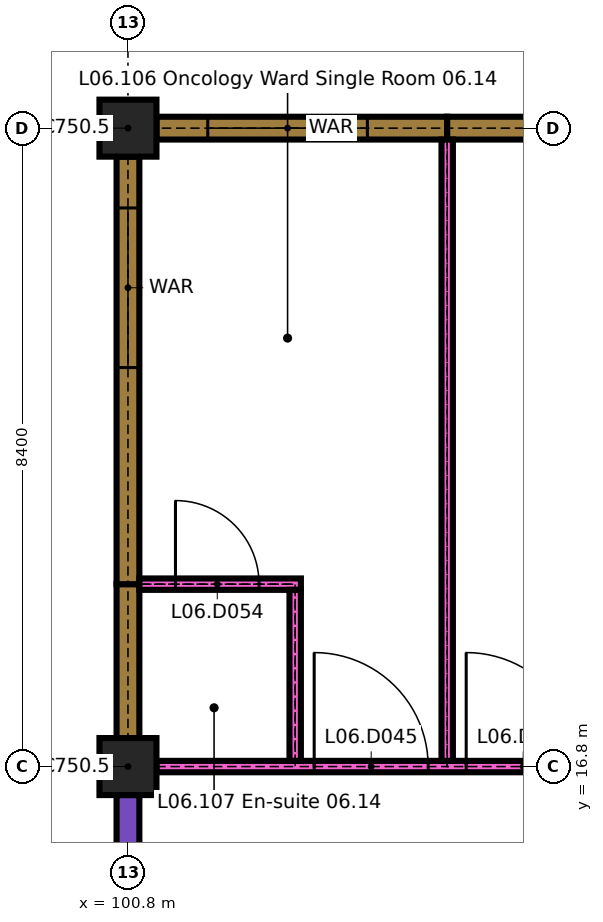
"""IFC4 building model, lengths in metres.
Left out: names, types, materials, properties, quantities, classifications, styles, units other than length and angle.
Written with IfcOpenShell. Run it as: python <this file> out.ifc"""

import sys

from ifc_helpers import new_model, si_unit, direction, frame, frame_2d, origin, origin_2d, place, context, subcontext, project, spatial, rectangle, extrude, element, fill, save


model = new_model("IFC4")
c1 = context("Model", 3, precision=1e-05, world=origin(), true_north=direction((0.0, 1.0)))
c2 = subcontext(c1, "Body", "Model", "MODEL_VIEW")
j1 = project(units=[si_unit("LENGTHUNIT", "METRE"), si_unit("PLANEANGLEUNIT", "RADIAN")], contexts=[c1])
p1 = place(None, origin())
s1 = spatial("IfcSite", under=j1, at=p1, CompositionType="ELEMENT")
p2 = place(p1, origin())
s2 = spatial("IfcBuilding", under=s1, at=p2, CompositionType="ELEMENT")
p3 = place(p2, frame((0.0, 0.0, 26.1)))
s3 = spatial("IfcBuildingStorey", under=s2, at=p3, CompositionType="ELEMENT", Elevation=26.1)
for number, where, z_axis, x_axis in (
    (1, (100.8, 16.8, 0.0), (0.0, 0.0, 1.0), (1.0, 0.0, 0.0)),
    (2, (100.8, 25.2, 0.0), (0.0, 0.0, 1.0), (1.0, 0.0, 0.0)),
):
    element("IfcColumn", number, at=place(p3, frame(where, z_axis=z_axis, x_axis=x_axis)), inside=s3, PredefinedType="COLUMN", context=c2, shape_type="SweptSolid", body=[
        extrude(rectangle(XDim=0.75, YDim=0.75, at=origin_2d()), origin(), (0.0, 0.0, 1.0), 3.2),
    ])
p4 = place(p3, frame((101.175, 25.2, 0.0), z_axis=(0.0, 0.0, 1.0), x_axis=(1.0, 0.0, 0.0)))
e3 = element("IfcWall", 3, at=p4, inside=s3, PredefinedType="SOLIDWALL", context=c2, shape_type="SweptSolid", body=[
    extrude(rectangle(XDim=3.825, YDim=0.3, at=frame_2d((1.913, 0.0))), origin(), (0.0, 0.0, 1.0), 2.9),
])
p5 = place(p4, frame((0.675, 0.0, 0.9)))
e4 = element("IfcOpeningElement", 4, at=p5, cuts=e3, PredefinedType="OPENING", context=c2, shape_type="SweptSolid", body=[
    extrude(rectangle(XDim=2.1, YDim=1.5, at=frame_2d((1.05, 0.75))), frame((0.0, 0.16, 0.0), z_axis=(0.0, -1.0, 0.0), x_axis=(1.0, 0.0, 0.0)), (0.0, 0.0, 1.0), 0.32),
])
p6 = place(p3, frame((105.0, 25.2, 0.0), z_axis=(0.0, 0.0, 1.0), x_axis=(1.0, 0.0, 0.0)))
e5 = element("IfcWall", 5, at=p6, inside=s3, PredefinedType="SOLIDWALL", context=c2, shape_type="SweptSolid", body=[
    extrude(rectangle(XDim=3.825, YDim=0.3, at=frame_2d((1.913, 0.0))), origin(), (0.0, 0.0, 1.0), 2.9),
])
p7 = place(p6, frame((1.05, 0.0, 0.9)))
e6 = element("IfcOpeningElement", 6, at=p7, cuts=e5, PredefinedType="OPENING", context=c2, shape_type="SweptSolid", body=[
    extrude(rectangle(XDim=2.1, YDim=1.5, at=frame_2d((1.05, 0.75))), frame((0.0, 0.16, 0.0), z_axis=(0.0, -1.0, 0.0), x_axis=(1.0, 0.0, 0.0)), (0.0, 0.0, 1.0), 0.32),
])
p8 = place(p3, frame((100.8, 13.8, 0.0), z_axis=(0.0, 0.0, 1.0), x_axis=(0.0, 1.0, 0.0)))
e7 = element("IfcWall", 7, at=p8, inside=s3, PredefinedType="SOLIDWALL", context=c2, shape_type="SweptSolid", body=[
    extrude(rectangle(XDim=2.625, YDim=0.3, at=frame_2d((1.312, 0.0))), origin(), (0.0, 0.0, 1.0), 3.3),
])
p9 = place(p8, frame((0.45, 0.0, 0.9)))
e8 = element("IfcOpeningElement", 8, at=p9, cuts=e7, PredefinedType="OPENING", context=c2, shape_type="SweptSolid", body=[
    extrude(rectangle(XDim=0.9, YDim=1.5, at=frame_2d((0.45, 0.75))), frame((0.0, 0.16, 0.0), z_axis=(0.0, -1.0, 0.0), x_axis=(1.0, 0.0, 0.0)), (0.0, 0.0, 1.0), 0.32),
])
p10 = place(p3, frame((100.8, 17.175, 0.0), z_axis=(0.0, 0.0, 1.0), x_axis=(0.0, 1.0, 0.0)))
e9 = element("IfcWall", 9, at=p10, inside=s3, PredefinedType="SOLIDWALL", context=c2, shape_type="SweptSolid", body=[
    extrude(rectangle(XDim=2.025, YDim=0.3, at=frame_2d((1.012, 0.0))), origin(), (0.0, 0.0, 1.0), 2.9),
])
p11 = place(p3, frame((100.8, 19.2, 0.0), z_axis=(0.0, 0.0, 1.0), x_axis=(0.0, 1.0, 0.0)))
e10 = element("IfcWall", 10, at=p11, inside=s3, PredefinedType="SOLIDWALL", context=c2, shape_type="SweptSolid", body=[
    extrude(rectangle(XDim=5.625, YDim=0.3, at=frame_2d((2.812, 0.0))), origin(), (0.0, 0.0, 1.0), 2.9),
])
p12 = place(p11, frame((2.85, 0.0, 0.9)))
e11 = element("IfcOpeningElement", 11, at=p12, cuts=e10, PredefinedType="OPENING", context=c2, shape_type="SweptSolid", body=[
    extrude(rectangle(XDim=2.1, YDim=1.5, at=frame_2d((1.05, 0.75))), frame((0.0, 0.16, 0.0), z_axis=(0.0, -1.0, 0.0), x_axis=(1.0, 0.0, 0.0)), (0.0, 0.0, 1.0), 0.32),
])
p13 = place(p3, frame((101.175, 16.8, 0.0), z_axis=(0.0, 0.0, 1.0), x_axis=(1.0, 0.0, 0.0)))
e12 = element("IfcWall", 12, at=p13, inside=s3, PredefinedType="PARTITIONING", context=c2, shape_type="SweptSolid", body=[
    extrude(rectangle(XDim=7.65, YDim=0.15, at=frame_2d((3.825, 0.0))), origin(), (0.0, 0.0, 1.0), 3.3),
])
p14 = place(p13, frame((2.075, 0.0, 0.0)))
e13 = element("IfcOpeningElement", 13, at=p14, cuts=e12, PredefinedType="OPENING", context=c2, shape_type="SweptSolid", body=[
    extrude(rectangle(XDim=1.5, YDim=2.4, at=frame_2d((0.75, 1.2))), frame((0.0, 0.085, 0.0), z_axis=(0.0, -1.0, 0.0), x_axis=(1.0, 0.0, 0.0)), (0.0, 0.0, 1.0), 0.17),
])
p15 = place(p13, frame((4.075, 0.0, 0.0)))
e14 = element("IfcOpeningElement", 14, at=p15, cuts=e12, PredefinedType="OPENING", context=c2, shape_type="SweptSolid", body=[
    extrude(rectangle(XDim=1.5, YDim=2.4, at=frame_2d((0.75, 1.2))), frame((0.0, 0.085, 0.0), z_axis=(0.0, -1.0, 0.0), x_axis=(1.0, 0.0, 0.0)), (0.0, 0.0, 1.0), 0.17),
])
p16 = place(p3, frame((100.95, 19.2, 0.0), z_axis=(0.0, 0.0, 1.0), x_axis=(1.0, 0.0, 0.0)))
e15 = element("IfcWall", 15, at=p16, inside=s3, PredefinedType="PARTITIONING", context=c2, shape_type="SweptSolid", body=[
    extrude(rectangle(XDim=2.125, YDim=0.15, at=frame_2d((1.062, 0.0))), origin(), (0.0, 0.0, 1.0), 3.3),
])
p17 = place(p16, frame((0.475, 0.0, 0.0)))
e16 = element("IfcOpeningElement", 16, at=p17, cuts=e15, PredefinedType="OPENING", context=c2, shape_type="SweptSolid", body=[
    extrude(rectangle(XDim=1.1, YDim=2.1, at=frame_2d((0.55, 1.05))), frame((0.0, 0.085, 0.0), z_axis=(0.0, -1.0, 0.0), x_axis=(1.0, 0.0, 0.0)), (0.0, 0.0, 1.0), 0.17),
])
p18 = place(p3, frame((103.0, 16.875, 0.0), z_axis=(0.0, 0.0, 1.0), x_axis=(0.0, 1.0, 0.0)))
e17 = element("IfcWall", 17, at=p18, inside=s3, PredefinedType="PARTITIONING", context=c2, shape_type="SweptSolid", body=[
    extrude(rectangle(XDim=2.25, YDim=0.15, at=frame_2d((1.125, 0.0))), origin(), (0.0, 0.0, 1.0), 3.3),
])
p19 = place(p3, frame((105.0, 16.875, 0.0), z_axis=(0.0, 0.0, 1.0), x_axis=(0.0, 1.0, 0.0)))
e18 = element("IfcWall", 18, at=p19, inside=s3, PredefinedType="PARTITIONING", context=c2, shape_type="SweptSolid", body=[
    extrude(rectangle(XDim=8.175, YDim=0.15, at=frame_2d((4.087, 0.0))), origin(), (0.0, 0.0, 1.0), 3.3),
])
p20 = place(p5, origin())
e19 = element("IfcWindow", 19, at=p20, inside=s3, PartitioningType="DOUBLE_PANEL_VERTICAL", PredefinedType="WINDOW", context=c2, shape_type="SweptSolid", body=[
    extrude(rectangle(XDim=2.1, YDim=1.5, at=frame_2d((1.05, 0.75))), frame((0.0, 0.05, 0.0), z_axis=(0.0, -1.0, 0.0), x_axis=(1.0, 0.0, 0.0)), (0.0, 0.0, 1.0), 0.1),
])
fill(e4, e19)
p21 = place(p12, origin())
e20 = element("IfcWindow", 20, at=p21, inside=s3, PartitioningType="DOUBLE_PANEL_VERTICAL", PredefinedType="WINDOW", context=c2, shape_type="SweptSolid", body=[
    extrude(rectangle(XDim=2.1, YDim=1.5, at=frame_2d((1.05, 0.75))), frame((0.0, 0.05, 0.0), z_axis=(0.0, -1.0, 0.0), x_axis=(1.0, 0.0, 0.0)), (0.0, 0.0, 1.0), 0.1),
])
fill(e11, e20)
p22 = place(p14, origin())
e21 = element("IfcDoor", 21, at=p22, inside=s3, OperationType="SINGLE_SWING_RIGHT", PredefinedType="DOOR", context=c2, shape_type="SweptSolid", body=[
    extrude(rectangle(XDim=1.5, YDim=2.4, at=frame_2d((0.75, 1.2))), frame((0.0, 0.03, 0.0), z_axis=(0.0, -1.0, 0.0), x_axis=(1.0, 0.0, 0.0)), (0.0, 0.0, 1.0), 0.06),
])
fill(e13, e21)
p23 = place(p15, origin())
e22 = element("IfcDoor", 22, at=p23, inside=s3, OperationType="SINGLE_SWING_RIGHT", PredefinedType="DOOR", context=c2, shape_type="SweptSolid", body=[
    extrude(rectangle(XDim=1.5, YDim=2.4, at=frame_2d((0.75, 1.2))), frame((0.0, 0.03, 0.0), z_axis=(0.0, -1.0, 0.0), x_axis=(1.0, 0.0, 0.0)), (0.0, 0.0, 1.0), 0.06),
])
fill(e14, e22)
p24 = place(p17, origin())
e23 = element("IfcDoor", 23, at=p24, inside=s3, OperationType="SINGLE_SWING_RIGHT", PredefinedType="DOOR", context=c2, shape_type="SweptSolid", body=[
    extrude(rectangle(XDim=1.1, YDim=2.1, at=frame_2d((0.55, 1.05))), frame((0.0, 0.025, 0.0), z_axis=(0.0, -1.0, 0.0), x_axis=(1.0, 0.0, 0.0)), (0.0, 0.0, 1.0), 0.05),
])
fill(e16, e23)
save(model, sys.argv[1])
